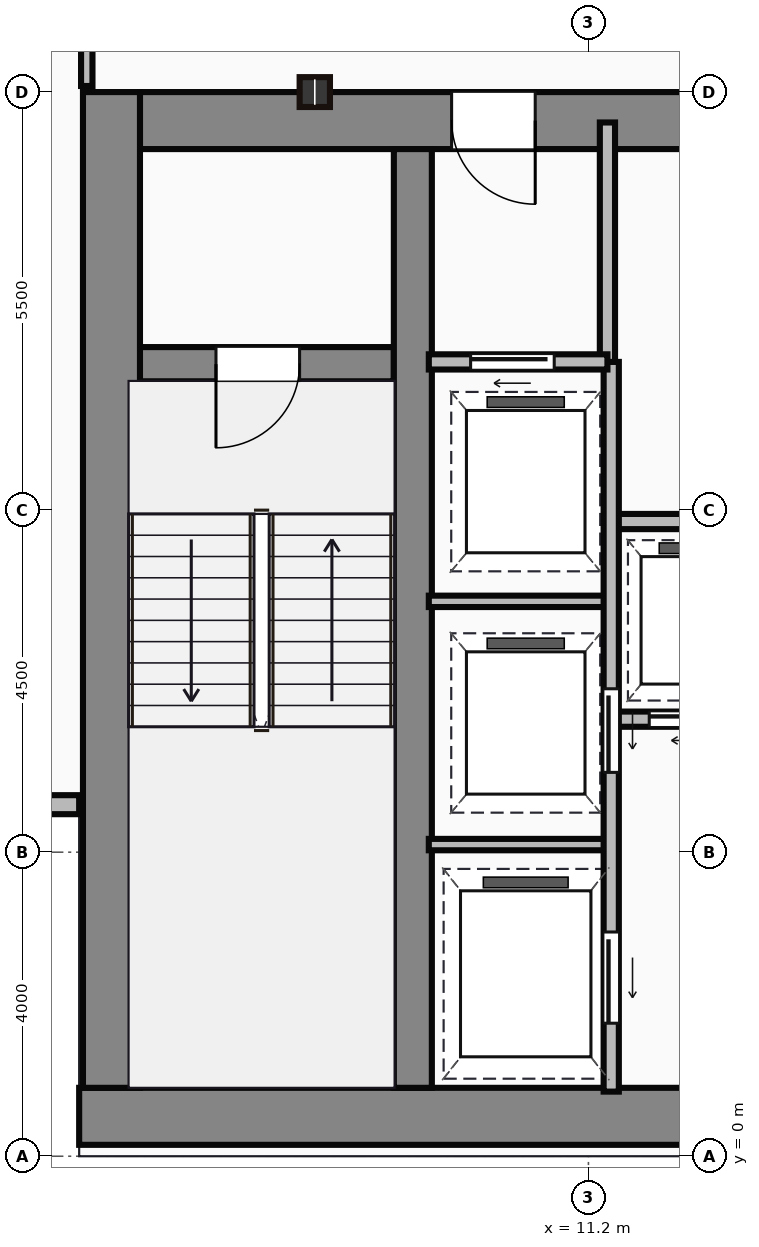
"""IFC4 building model, lengths in metres.
Left out: names, types, materials, properties, quantities, classifications, styles, units other than length and angle.
Written with IfcOpenShell. Run it as: python <this file> out.ifc"""

import sys

from ifc_helpers import new_model, si_unit, direction, frame, frame_2d, origin, origin_2d, place, context, subcontext, project, spatial, rectangle, i_section, extrude, source, transform, mapped, element, fill, save


model = new_model("IFC4")
c1 = context("Model", 3, precision=1e-05, world=origin(), true_north=direction((0.0, 1.0)))
c2 = subcontext(c1, "Body", "Model", "MODEL_VIEW")
j1 = project(units=[si_unit("LENGTHUNIT", "METRE"), si_unit("PLANEANGLEUNIT", "RADIAN")], contexts=[c1])
p1 = place(None, origin())
s1 = spatial("IfcSite", under=j1, at=p1, CompositionType="ELEMENT")
p2 = place(p1, origin())
s2 = spatial("IfcBuilding", under=s1, at=p2, CompositionType="ELEMENT")
p3 = place(p2, frame((0.0, 0.0, 117.85)))
s3 = spatial("IfcBuildingStorey", under=s2, at=p3, CompositionType="ELEMENT", Elevation=117.85)
m1 = source(origin(), c2, "Body", "SweptSolid", [
    extrude(rectangle(XDim=29.5, YDim=0.75, at=frame_2d((14.75, 0.0))), origin(), (0.0, 0.0, 1.0), 3.65),
])
p4 = place(p3, frame((4.5, 0.525, 0.0), z_axis=(0.0, 0.0, 1.0), x_axis=(1.0, 0.0, 0.0)))
e1 = element("IfcWall", 1, at=p4, inside=s3, PredefinedType="SHEAR", context=c2, shape_type="MappedRepresentation", body=[
    mapped(m1, transform((0.0, 0.0, 0.0))),
])
m2 = source(origin(), c2, "Body", "SweptSolid", [
    extrude(rectangle(XDim=13.1, YDim=0.75, at=frame_2d((6.55, 0.0))), origin(), (0.0, 0.0, 1.0), 3.65),
])
p5 = place(p3, frame((4.925, 0.9, 0.0), z_axis=(0.0, 0.0, 1.0), x_axis=(0.0, 1.0, 0.0)))
e2 = element("IfcWall", 2, at=p5, inside=s3, PredefinedType="SHEAR", context=c2, shape_type="MappedRepresentation", body=[
    mapped(m2, transform((0.0, 0.0, 0.0))),
])
m3 = source(origin(), c2, "Body", "SweptSolid", [
    extrude(rectangle(XDim=9.1, YDim=0.75, at=frame_2d((4.55, 0.0))), origin(), (0.0, 0.0, 1.0), 3.65),
])
p6 = place(p3, frame((5.3, 13.625, 0.0), z_axis=(0.0, 0.0, 1.0), x_axis=(1.0, 0.0, 0.0)))
e3 = element("IfcWall", 3, at=p6, inside=s3, PredefinedType="SHEAR", context=c2, shape_type="MappedRepresentation", body=[
    mapped(m3, transform((0.0, 0.0, 0.0))),
])
p7 = place(p6, frame((4.1, 0.0, 0.0)))
e4 = element("IfcOpeningElement", 4, at=p7, cuts=e3, PredefinedType="OPENING", context=c2, shape_type="SweptSolid", body=[
    extrude(rectangle(XDim=1.1, YDim=2.15, at=frame_2d((0.55, 1.075))), frame((0.0, 0.385, 0.0), z_axis=(0.0, -1.0, 0.0), x_axis=(1.0, 0.0, 0.0)), (0.0, 0.0, 1.0), 0.77),
])
m4 = source(origin(), c2, "Body", "SweptSolid", [
    extrude(rectangle(XDim=12.35, YDim=0.5, at=frame_2d((6.175, 0.0))), origin(), (0.0, 0.0, 1.0), 3.65),
])
p8 = place(p3, frame((8.89, 0.9, 0.0), z_axis=(0.0, 0.0, 1.0), x_axis=(0.0, 1.0, 0.0)))
e5 = element("IfcWall", 5, at=p8, inside=s3, PredefinedType="SHEAR", context=c2, shape_type="MappedRepresentation", body=[
    mapped(m4, transform((0.0, 0.0, 0.0))),
])
m5 = source(origin(), c2, "Body", "SweptSolid", [
    extrude(rectangle(XDim=3.39, YDim=0.45, at=frame_2d((1.695, 0.0))), origin(), (0.0, 0.0, 1.0), 3.65),
])
p9 = place(p3, frame((5.25, 10.42, 0.0), z_axis=(0.0, 0.0, 1.0), x_axis=(1.0, 0.0, 0.0)))
e6 = element("IfcWall", 6, at=p9, inside=s3, PredefinedType="SHEAR", context=c2, shape_type="MappedRepresentation", body=[
    mapped(m5, transform((0.0, 0.0, 0.0))),
])
p10 = place(p9, frame((1.05, 0.0, 0.0)))
e7 = element("IfcOpeningElement", 7, at=p10, cuts=e6, PredefinedType="OPENING", context=c2, shape_type="SweptSolid", body=[
    extrude(rectangle(XDim=1.1, YDim=2.15, at=frame_2d((0.55, 1.075))), frame((0.0, 0.235, 0.0), z_axis=(0.0, -1.0, 0.0), x_axis=(1.0, 0.0, 0.0)), (0.0, 0.0, 1.0), 0.47),
])
m6 = source(origin(), c2, "Body", "SweptSolid", [
    extrude(i_section(OverallWidth=0.399, OverallDepth=0.393, WebThickness=0.023, FlangeThickness=0.037, at=origin_2d()), origin(), (0.0, 0.0, 1.0), 3.65),
])
p11 = place(p3, frame((7.6, 14.0, 0.0), z_axis=(0.0, 0.0, 1.0), x_axis=(1.0, 0.0, 0.0)))
e8 = element("IfcColumn", 8, at=p11, inside=s3, PredefinedType="COLUMN", context=c2, shape_type="MappedRepresentation", body=[
    mapped(m6, transform((0.0, 0.0, 0.0))),
])
m7 = source(origin(), c2, "Body", "SweptSolid", [
    extrude(rectangle(XDim=4.5, YDim=0.25, at=frame_2d((2.25, 0.0))), origin(), (0.0, 0.0, 1.0), 3.4),
])
p12 = place(p3, frame((0.0, 4.625, 0.0), z_axis=(0.0, 0.0, 1.0), x_axis=(1.0, 0.0, 0.0)))
e9 = element("IfcWall", 9, at=p12, inside=s3, PredefinedType="STANDARD", context=c2, shape_type="MappedRepresentation", body=[
    mapped(m7, transform((0.0, 0.0, 0.0))),
])
m8 = source(origin(), c2, "Body", "SweptSolid", [
    extrude(rectangle(XDim=3.18, YDim=0.2, at=frame_2d((1.59, 0.0))), origin(), (0.0, 0.0, 1.0), 3.4),
])
p13 = place(p3, frame((11.45, 10.42, 0.0), z_axis=(0.0, 0.0, 1.0), x_axis=(0.0, 1.0, 0.0)))
e10 = element("IfcWall", 10, at=p13, inside=s3, PredefinedType="PARTITIONING", context=c2, shape_type="MappedRepresentation", body=[
    mapped(m8, transform((0.0, 0.0, 0.0))),
])
m9 = source(origin(), c2, "Body", "SweptSolid", [
    extrude(rectangle(XDim=2.35, YDim=0.2, at=frame_2d((1.175, 0.0))), origin(), (0.0, 0.0, 1.0), 3.4),
])
p14 = place(p3, frame((9.1, 10.45, 0.0), z_axis=(0.0, 0.0, 1.0), x_axis=(1.0, 0.0, 0.0)))
e11 = element("IfcWall", 11, at=p14, inside=s3, PredefinedType="PARTITIONING", context=c2, shape_type="MappedRepresentation", body=[
    mapped(m9, transform((0.0, 0.0, 0.0))),
])
p15 = place(p14, frame((0.55, 0.0, 0.0)))
e12 = element("IfcOpeningElement", 12, at=p15, cuts=e11, PredefinedType="OPENING", context=c2, shape_type="SweptSolid", body=[
    extrude(rectangle(XDim=1.1, YDim=2.15, at=frame_2d((0.55, 1.075))), frame((0.0, 0.11, 0.0), z_axis=(0.0, -1.0, 0.0), x_axis=(1.0, 0.0, 0.0)), (0.0, 0.0, 1.0), 0.22),
])
m10 = source(origin(), c2, "Body", "SweptSolid", [
    extrude(rectangle(XDim=9.6, YDim=0.2, at=frame_2d((4.8, 0.0))), origin(), (0.0, 0.0, 1.0), 3.4),
])
p16 = place(p3, frame((11.5, 0.85, 0.0), z_axis=(0.0, 0.0, 1.0), x_axis=(0.0, 1.0, 0.0)))
e13 = element("IfcWall", 13, at=p16, inside=s3, PredefinedType="PARTITIONING", context=c2, shape_type="MappedRepresentation", body=[
    mapped(m10, transform((0.0, 0.0, 0.0))),
])
p17 = place(p16, frame((4.2, 0.0, 0.0)))
e14 = element("IfcOpeningElement", 14, at=p17, cuts=e13, PredefinedType="OPENING", context=c2, shape_type="SweptSolid", body=[
    extrude(rectangle(XDim=1.1, YDim=2.15, at=frame_2d((0.55, 1.075))), frame((0.0, 0.11, 0.0), z_axis=(0.0, -1.0, 0.0), x_axis=(1.0, 0.0, 0.0)), (0.0, 0.0, 1.0), 0.22),
])
p18 = place(p16, frame((0.9, 0.0, 0.0)))
e15 = element("IfcOpeningElement", 15, at=p18, cuts=e13, PredefinedType="OPENING", context=c2, shape_type="SweptSolid", body=[
    extrude(rectangle(XDim=1.2, YDim=2.15, at=frame_2d((0.6, 1.075))), frame((0.0, 0.11, 0.0), z_axis=(0.0, -1.0, 0.0), x_axis=(1.0, 0.0, 0.0)), (0.0, 0.0, 1.0), 0.22),
])
m11 = source(origin(), c2, "Body", "SweptSolid", [
    extrude(rectangle(XDim=2.4, YDim=0.15, at=frame_2d((1.2, 0.0))), origin(), (0.0, 0.0, 1.0), 3.4),
])
for number, where, z_axis, x_axis in (
    (16, (9.1, 4.1, 0.0), (0.0, 0.0, 1.0), (1.0, 0.0, 0.0)),
    (17, (9.1, 7.3, 0.0), (0.0, 0.0, 1.0), (1.0, 0.0, 0.0)),
):
    element("IfcWall", number, at=place(p3, frame(where, z_axis=z_axis, x_axis=x_axis)), inside=s3, PredefinedType="PARTITIONING", context=c2, shape_type="MappedRepresentation", body=[
        mapped(m11, transform((0.0, 0.0, 0.0))),
    ])
m12 = source(origin(), c2, "Body", "SweptSolid", [
    extrude(rectangle(XDim=11.85, YDim=0.2, at=frame_2d((5.925, 0.0))), origin(), (0.0, 0.0, 1.0), 3.4),
])
p19 = place(p3, frame((11.55, 5.75, 0.0), z_axis=(0.0, 0.0, 1.0), x_axis=(1.0, 0.0, 0.0)))
e18 = element("IfcWall", 18, at=p19, inside=s3, PredefinedType="PARTITIONING", context=c2, shape_type="MappedRepresentation", body=[
    mapped(m12, transform((0.0, 0.0, 0.0))),
])
p20 = place(p19, frame((0.45, 0.0, 0.0)))
e19 = element("IfcOpeningElement", 19, at=p20, cuts=e18, PredefinedType="OPENING", context=c2, shape_type="SweptSolid", body=[
    extrude(rectangle(XDim=1.05, YDim=2.15, at=frame_2d((0.525, 1.075))), frame((0.0, 0.11, 0.0), z_axis=(0.0, -1.0, 0.0), x_axis=(1.0, 0.0, 0.0)), (0.0, 0.0, 1.0), 0.22),
])
p21 = place(p19, frame((2.4, 0.0, 0.0)))
e20 = element("IfcOpeningElement", 20, at=p21, cuts=e18, PredefinedType="OPENING", context=c2, shape_type="SweptSolid", body=[
    extrude(rectangle(XDim=1.05, YDim=2.15, at=frame_2d((0.525, 1.075))), frame((0.0, 0.11, 0.0), z_axis=(0.0, -1.0, 0.0), x_axis=(1.0, 0.0, 0.0)), (0.0, 0.0, 1.0), 0.22),
])
p22 = place(p19, frame((4.35, 0.0, 0.0)))
e21 = element("IfcOpeningElement", 21, at=p22, cuts=e18, PredefinedType="OPENING", context=c2, shape_type="SweptSolid", body=[
    extrude(rectangle(XDim=1.05, YDim=2.15, at=frame_2d((0.525, 1.075))), frame((0.0, 0.11, 0.0), z_axis=(0.0, -1.0, 0.0), x_axis=(1.0, 0.0, 0.0)), (0.0, 0.0, 1.0), 0.22),
])
p23 = place(p19, frame((6.3, 0.0, 0.0)))
e22 = element("IfcOpeningElement", 22, at=p23, cuts=e18, PredefinedType="OPENING", context=c2, shape_type="SweptSolid", body=[
    extrude(rectangle(XDim=1.05, YDim=2.15, at=frame_2d((0.525, 1.075))), frame((0.0, 0.11, 0.0), z_axis=(0.0, -1.0, 0.0), x_axis=(1.0, 0.0, 0.0)), (0.0, 0.0, 1.0), 0.22),
])
p24 = place(p19, frame((8.25, 0.0, 0.0)))
e23 = element("IfcOpeningElement", 23, at=p24, cuts=e18, PredefinedType="OPENING", context=c2, shape_type="SweptSolid", body=[
    extrude(rectangle(XDim=1.05, YDim=2.15, at=frame_2d((0.525, 1.075))), frame((0.0, 0.11, 0.0), z_axis=(0.0, -1.0, 0.0), x_axis=(1.0, 0.0, 0.0)), (0.0, 0.0, 1.0), 0.22),
])
p25 = place(p19, frame((10.2, 0.0, 0.0)))
e24 = element("IfcOpeningElement", 24, at=p25, cuts=e18, PredefinedType="OPENING", context=c2, shape_type="SweptSolid", body=[
    extrude(rectangle(XDim=1.05, YDim=2.15, at=frame_2d((0.525, 1.075))), frame((0.0, 0.11, 0.0), z_axis=(0.0, -1.0, 0.0), x_axis=(1.0, 0.0, 0.0)), (0.0, 0.0, 1.0), 0.22),
])
p26 = place(p3, frame((11.55, 8.35, 0.0), z_axis=(0.0, 0.0, 1.0), x_axis=(1.0, 0.0, 0.0)))
e25 = element("IfcWall", 25, at=p26, inside=s3, PredefinedType="PARTITIONING", context=c2, shape_type="MappedRepresentation", body=[
    mapped(m12, transform((0.0, 0.0, 0.0))),
])
m13 = source(origin(), c2, "Body", "SweptSolid", [
    extrude(rectangle(XDim=2.22, YDim=0.15, at=frame_2d((1.11, 0.0))), origin(), (0.0, 0.0, 1.0), 3.4),
])
p27 = place(p3, frame((4.6, 14.08, 0.0), z_axis=(0.0, 0.0, 1.0), x_axis=(0.0, 1.0, 0.0)))
e26 = element("IfcWall", 26, at=p27, inside=s3, PredefinedType="PARTITIONING", context=c2, shape_type="MappedRepresentation", body=[
    mapped(m13, transform((0.0, 0.0, 0.0))),
])
m14 = source(origin(), c2, "Body", "SweptSolid", [
    extrude(rectangle(XDim=1.1, YDim=2.15, at=frame_2d((0.55, 1.075))), frame((0.0, 0.025, 0.0), z_axis=(0.0, -1.0, 0.0), x_axis=(1.0, 0.0, 0.0)), (0.0, 0.0, 1.0), 0.05),
])
p28 = place(p10, frame((1.1, 0.0, 0.0), z_axis=(0.0, 0.0, 1.0), x_axis=(-1.0, 0.0, 0.0)))
e27 = element("IfcDoor", 27, at=p28, inside=s3, OperationType="SINGLE_SWING_LEFT", PredefinedType="DOOR", context=c2, shape_type="MappedRepresentation", body=[
    mapped(m14, transform((0.0, 0.0, 0.0))),
])
fill(e7, e27)
p29 = place(p7, origin())
e28 = element("IfcDoor", 28, at=p29, inside=s3, OperationType="SINGLE_SWING_RIGHT", PredefinedType="DOOR", context=c2, shape_type="MappedRepresentation", body=[
    mapped(m14, transform((0.0, 0.0, 0.0))),
])
fill(e4, e28)
p30 = place(p15, origin())
e29 = element("IfcDoor", 29, at=p30, inside=s3, OperationType="SLIDING_TO_LEFT", PredefinedType="DOOR", context=c2, shape_type="MappedRepresentation", body=[
    mapped(m14, transform((0.0, 0.0, 0.0))),
])
fill(e12, e29)
p31 = place(p17, frame((1.1, 0.0, 0.0), z_axis=(0.0, 0.0, 1.0), x_axis=(-1.0, 0.0, 0.0)))
e30 = element("IfcDoor", 30, at=p31, inside=s3, OperationType="SLIDING_TO_LEFT", PredefinedType="DOOR", context=c2, shape_type="MappedRepresentation", body=[
    mapped(m14, transform((0.0, 0.0, 0.0))),
])
fill(e14, e30)
m15 = source(origin(), c2, "Body", "SweptSolid", [
    extrude(rectangle(XDim=1.2, YDim=2.15, at=frame_2d((0.6, 1.075))), frame((0.0, 0.025, 0.0), z_axis=(0.0, -1.0, 0.0), x_axis=(1.0, 0.0, 0.0)), (0.0, 0.0, 1.0), 0.05),
])
p32 = place(p18, frame((1.2, 0.0, 0.0), z_axis=(0.0, 0.0, 1.0), x_axis=(-1.0, 0.0, 0.0)))
e31 = element("IfcDoor", 31, at=p32, inside=s3, OperationType="SLIDING_TO_LEFT", PredefinedType="DOOR", context=c2, shape_type="MappedRepresentation", body=[
    mapped(m15, transform((0.0, 0.0, 0.0))),
])
fill(e15, e31)
m16 = source(origin(), c2, "Body", "SweptSolid", [
    extrude(rectangle(XDim=1.05, YDim=2.15, at=frame_2d((0.525, 1.075))), frame((0.0, 0.025, 0.0), z_axis=(0.0, -1.0, 0.0), x_axis=(1.0, 0.0, 0.0)), (0.0, 0.0, 1.0), 0.05),
])
p33 = place(p20, frame((1.05, 0.0, 0.0), z_axis=(0.0, 0.0, 1.0), x_axis=(-1.0, 0.0, 0.0)))
e32 = element("IfcDoor", 32, at=p33, inside=s3, OperationType="SLIDING_TO_LEFT", PredefinedType="DOOR", context=c2, shape_type="MappedRepresentation", body=[
    mapped(m16, transform((0.0, 0.0, 0.0))),
])
fill(e19, e32)
save(model, sys.argv[1])
